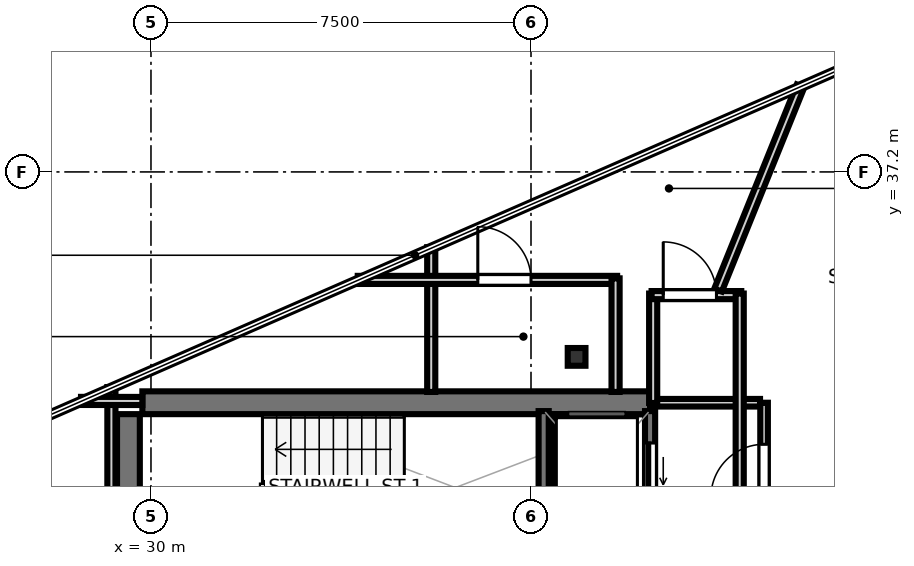
"""IFC4 building model, lengths in metres.
Left out: names, types, materials, properties, quantities, classifications, styles, units other than length and angle.
Written with IfcOpenShell. Run it as: python <this file> out.ifc"""

import sys

from ifc_helpers import new_model, si_unit, direction, frame, frame_2d, origin, origin_2d, place, context, subcontext, project, spatial, rectangle, i_section, extrude, element, fill, save


model = new_model("IFC4")
c1 = context("Model", 3, precision=1e-05, world=origin(), true_north=direction((0.0, 1.0)))
c2 = subcontext(c1, "Body", "Model", "MODEL_VIEW")
j1 = project(units=[si_unit("LENGTHUNIT", "METRE"), si_unit("PLANEANGLEUNIT", "RADIAN")], contexts=[c1])
p1 = place(None, origin())
s1 = spatial("IfcSite", under=j1, at=p1, CompositionType="ELEMENT")
p2 = place(p1, origin())
s2 = spatial("IfcBuilding", under=s1, at=p2, CompositionType="ELEMENT")
p3 = place(p2, frame((0.0, 0.0, 363.8)))
s3 = spatial("IfcBuildingStorey", under=s2, at=p3, CompositionType="ELEMENT", Elevation=363.8)
p4 = place(p3, frame((29.83, 32.645, 0.0), z_axis=(0.0, 0.0, 1.0), x_axis=(1.0, 0.0, 0.0)))
e1 = element("IfcWall", 1, at=p4, inside=s3, PredefinedType="SHEAR", context=c2, shape_type="SweptSolid", body=[
    extrude(rectangle(XDim=10.02, YDim=0.45, at=frame_2d((5.01, 0.0))), origin(), (0.0, 0.0, 1.0), 3.55),
])
for number, where, z_axis, x_axis in (
    (2, (29.555, 24.98, 0.0), (0.0, 0.0, 1.0), (0.0, 1.0, 0.0)),
    (3, (38.18, 24.98, 0.0), (0.0, 0.0, 1.0), (0.0, 1.0, 0.0)),
):
    element("IfcWall", number, at=place(p3, frame(where, z_axis=z_axis, x_axis=x_axis)), inside=s3, PredefinedType="SHEAR", context=c2, shape_type="SweptSolid", body=[
        extrude(rectangle(XDim=7.44, YDim=0.45, at=frame_2d((3.72, 0.0))), origin(), (0.0, 0.0, 1.0), 3.55),
    ])
p5 = place(p3, frame((38.4, 33.55, 0.0), z_axis=(0.0, 0.0, 1.0), x_axis=(1.0, 0.0, 0.0)))
e4 = element("IfcColumn", 4, at=p5, inside=s3, PredefinedType="COLUMN", context=c2, shape_type="SweptSolid", body=[
    extrude(i_section(OverallWidth=0.35, OverallDepth=0.35, WebThickness=0.012, FlangeThickness=0.019, at=origin_2d()), origin(), (0.0, 0.0, 1.0), 3.75),
])
p6 = place(p3, frame((39.85, 30.12, 0.0), z_axis=(0.0, 0.0, 1.0), x_axis=(0.0, 1.0, 0.0)))
e5 = element("IfcWall", 5, at=p6, inside=s3, PredefinedType="SOLIDWALL", context=c2, shape_type="SweptSolid", body=[
    extrude(rectangle(XDim=2.36, YDim=0.2, at=frame_2d((1.18, 0.0))), origin(), (0.0, 0.0, 1.0), 3.55),
])
p7 = place(p6, frame((0.63, 0.0, 0.0)))
e6 = element("IfcOpeningElement", 6, at=p7, cuts=e5, PredefinedType="OPENING", context=c2, shape_type="SweptSolid", body=[
    extrude(rectangle(XDim=1.1, YDim=2.15, at=frame_2d((0.55, 1.075))), frame((0.0, 0.11, 0.0), z_axis=(0.0, -1.0, 0.0), x_axis=(1.0, 0.0, 0.0)), (0.0, 0.0, 1.0), 0.22),
])
p8 = place(p3, frame((37.75, 30.12, 0.0), z_axis=(0.0, 0.0, 1.0), x_axis=(0.0, 1.0, 0.0)))
e7 = element("IfcWall", 7, at=p8, inside=s3, PredefinedType="SOLIDWALL", context=c2, shape_type="SweptSolid", body=[
    extrude(rectangle(XDim=2.36, YDim=0.2, at=frame_2d((1.18, 0.0))), origin(), (0.0, 0.0, 1.0), 3.55),
])
p9 = place(p3, frame((42.1, 29.85, 0.0), z_axis=(0.0, 0.0, 1.0), x_axis=(0.0, 1.0, 0.0)))
e8 = element("IfcWall", 8, at=p9, inside=s3, PredefinedType="PARTITIONING", context=c2, shape_type="SweptSolid", body=[
    extrude(rectangle(XDim=2.795, YDim=0.15, at=frame_2d((1.397, 0.0))), origin(), (0.0, 0.0, 1.0), 2.87),
])
p10 = place(p9, frame((0.925, 0.0, 0.0)))
e9 = element("IfcOpeningElement", 9, at=p10, cuts=e8, PredefinedType="OPENING", context=c2, shape_type="SweptSolid", body=[
    extrude(rectangle(XDim=1.05, YDim=2.15, at=frame_2d((0.525, 1.075))), frame((0.0, 0.085, 0.0), z_axis=(0.0, -1.0, 0.0), x_axis=(1.0, 0.0, 0.0)), (0.0, 0.0, 1.0), 0.17),
])
p11 = place(p3, frame((39.96, 32.645, 0.0), z_axis=(0.0, 0.0, 1.0), x_axis=(1.0, 0.0, 0.0)))
e10 = element("IfcWall", 10, at=p11, inside=s3, PredefinedType="PARTITIONING", context=c2, shape_type="SweptSolid", body=[
    extrude(rectangle(XDim=2.06, YDim=0.15, at=frame_2d((1.03, 0.0))), origin(), (0.0, 0.0, 1.0), 2.87),
])
p12 = place(p3, frame((39.911, 32.64, 0.0), z_axis=(0.0, 0.0, 1.0), x_axis=(0.0, 1.0, 0.0)))
e11 = element("IfcWall", 11, at=p12, inside=s3, PredefinedType="PARTITIONING", context=c2, shape_type="SweptSolid", body=[
    extrude(rectangle(XDim=2.16, YDim=0.16, at=frame_2d((1.08, 0.0))), origin(), (0.0, 0.0, 1.0), 2.87),
])
p13 = place(p3, frame((39.88, 34.769, 0.0), z_axis=(0.0, 0.0, 1.0), x_axis=(1.0, 0.0, 0.0)))
e12 = element("IfcWall", 12, at=p13, inside=s3, PredefinedType="PARTITIONING", context=c2, shape_type="SweptSolid", body=[
    extrude(rectangle(XDim=1.77, YDim=0.16, at=frame_2d((0.885, 0.0))), origin(), (0.0, 0.0, 1.0), 2.87),
])
p14 = place(p13, frame((0.23, 0.0, 0.0)))
e13 = element("IfcOpeningElement", 13, at=p14, cuts=e12, PredefinedType="OPENING", context=c2, shape_type="SweptSolid", body=[
    extrude(rectangle(XDim=1.05, YDim=2.15, at=frame_2d((0.525, 1.075))), frame((0.0, 0.09, 0.0), z_axis=(0.0, -1.0, 0.0), x_axis=(1.0, 0.0, 0.0)), (0.0, 0.0, 1.0), 0.18),
])
p15 = place(p3, frame((41.619, 34.8, 0.0), z_axis=(0.0, 0.0, 1.0), x_axis=(0.0, -1.0, 0.0)))
e14 = element("IfcWall", 14, at=p15, inside=s3, PredefinedType="PARTITIONING", context=c2, shape_type="SweptSolid", body=[
    extrude(rectangle(XDim=12.75, YDim=0.16, at=frame_2d((6.375, 0.0))), origin(), (0.0, 0.0, 1.0), 2.87),
])
p16 = place(p15, frame((5.85, 0.0, 0.0)))
e15 = element("IfcOpeningElement", 15, at=p16, cuts=e14, PredefinedType="OPENING", context=c2, shape_type="SweptSolid", body=[
    extrude(rectangle(XDim=1.05, YDim=2.15, at=frame_2d((0.525, 1.075))), frame((0.0, 0.09, 0.0), z_axis=(0.0, -1.0, 0.0), x_axis=(1.0, 0.0, 0.0)), (0.0, 0.0, 1.0), 0.18),
])
p17 = place(p3, frame((35.531, 32.858, 0.0), z_axis=(0.0, 0.0, 1.0), x_axis=(0.0, 1.0, 0.0)))
e16 = element("IfcWall", 16, at=p17, inside=s3, PredefinedType="PARTITIONING", context=c2, shape_type="SweptSolid", body=[
    extrude(rectangle(XDim=2.856, YDim=0.16, at=frame_2d((1.428, 0.0))), origin(), (0.0, 0.0, 1.0), 2.87),
])
p18 = place(p3, frame((34.081, 35.069, 0.0), z_axis=(0.0, 0.0, 1.0), x_axis=(1.0, 0.0, 0.0)))
e17 = element("IfcWall", 17, at=p18, inside=s3, PredefinedType="PARTITIONING", context=c2, shape_type="SweptSolid", body=[
    extrude(rectangle(XDim=5.119, YDim=0.16, at=frame_2d((2.56, 0.0))), origin(), (0.0, 0.0, 1.0), 2.87),
])
p19 = place(p18, frame((2.369, 0.0, 0.0)))
e18 = element("IfcOpeningElement", 18, at=p19, cuts=e17, PredefinedType="OPENING", context=c2, shape_type="SweptSolid", body=[
    extrude(rectangle(XDim=1.05, YDim=2.15, at=frame_2d((0.525, 1.075))), frame((0.0, 0.09, 0.0), z_axis=(0.0, -1.0, 0.0), x_axis=(1.0, 0.0, 0.0)), (0.0, 0.0, 1.0), 0.18),
])
p20 = place(p3, frame((39.169, 35.1, 0.0), z_axis=(0.0, 0.0, 1.0), x_axis=(0.0, -1.0, 0.0)))
e19 = element("IfcWall", 19, at=p20, inside=s3, PredefinedType="PARTITIONING", context=c2, shape_type="SweptSolid", body=[
    extrude(rectangle(XDim=2.242, YDim=0.16, at=frame_2d((1.121, 0.0))), origin(), (0.0, 0.0, 1.0), 2.87),
])
p21 = place(p3, frame((29.219, 32.954, 0.0), z_axis=(0.0, 0.0, 1.0), x_axis=(0.0, -1.0, 0.0)))
e20 = element("IfcWall", 20, at=p21, inside=s3, PredefinedType="PARTITIONING", context=c2, shape_type="SweptSolid", body=[
    extrude(rectangle(XDim=8.6, YDim=0.16, at=frame_2d((4.3, 0.0))), origin(), (0.0, 0.0, 1.0), 2.87),
])
p22 = place(p3, frame((41.192, 34.868, 0.0), z_axis=(0.0, 0.0, 1.0), x_axis=(0.374633996442, 0.927172782555, 0.0)))
e21 = element("IfcWall", 21, at=p22, inside=s3, PredefinedType="PARTITIONING", context=c2, shape_type="SweptSolid", body=[
    extrude(rectangle(XDim=4.345, YDim=0.16, at=frame_2d((2.172, 0.0))), origin(), (0.0, 0.0, 1.0), 2.87),
])
p23 = place(p3, frame((29.83, 32.68, 0.0), z_axis=(0.0, 0.0, 1.0), x_axis=(-0.999999491903, 0.001008064004, 0.0)))
e22 = element("IfcWall", 22, at=p23, inside=s3, PredefinedType="PARTITIONING", context=c2, shape_type="SweptSolid", body=[
    extrude(rectangle(XDim=1.211, YDim=0.16, at=frame_2d((0.605, 0.0))), origin(), (0.0, 0.0, 1.0), 2.87),
])
p24 = place(p7, origin())
e23 = element("IfcDoor", 23, at=p24, inside=s3, OperationType="SLIDING_TO_LEFT", PredefinedType="DOOR", context=c2, shape_type="SweptSolid", body=[
    extrude(rectangle(XDim=1.1, YDim=2.15, at=frame_2d((0.55, 1.075))), frame((0.0, 0.025, 0.0), z_axis=(0.0, -1.0, 0.0), x_axis=(1.0, 0.0, 0.0)), (0.0, 0.0, 1.0), 0.05),
])
fill(e6, e23)
p25 = place(p10, origin())
e24 = element("IfcDoor", 24, at=p25, inside=s3, OperationType="SINGLE_SWING_LEFT", PredefinedType="DOOR", context=c2, shape_type="SweptSolid", body=[
    extrude(rectangle(XDim=1.05, YDim=2.15, at=frame_2d((0.525, 1.075))), frame((0.0, 0.025, 0.0), z_axis=(0.0, -1.0, 0.0), x_axis=(1.0, 0.0, 0.0)), (0.0, 0.0, 1.0), 0.05),
])
fill(e9, e24)
p26 = place(p14, origin())
e25 = element("IfcDoor", 25, at=p26, inside=s3, OperationType="SINGLE_SWING_LEFT", PredefinedType="DOOR", context=c2, shape_type="SweptSolid", body=[
    extrude(rectangle(XDim=1.05, YDim=2.15, at=frame_2d((0.525, 1.075))), frame((0.0, 0.025, 0.0), z_axis=(0.0, -1.0, 0.0), x_axis=(1.0, 0.0, 0.0)), (0.0, 0.0, 1.0), 0.05),
])
fill(e13, e25)
p27 = place(p19, origin())
e26 = element("IfcDoor", 26, at=p27, inside=s3, OperationType="SINGLE_SWING_LEFT", PredefinedType="DOOR", context=c2, shape_type="SweptSolid", body=[
    extrude(rectangle(XDim=1.05, YDim=2.15, at=frame_2d((0.525, 1.075))), frame((0.0, 0.025, 0.0), z_axis=(0.0, -1.0, 0.0), x_axis=(1.0, 0.0, 0.0)), (0.0, 0.0, 1.0), 0.05),
])
fill(e18, e26)
save(model, sys.argv[1])
